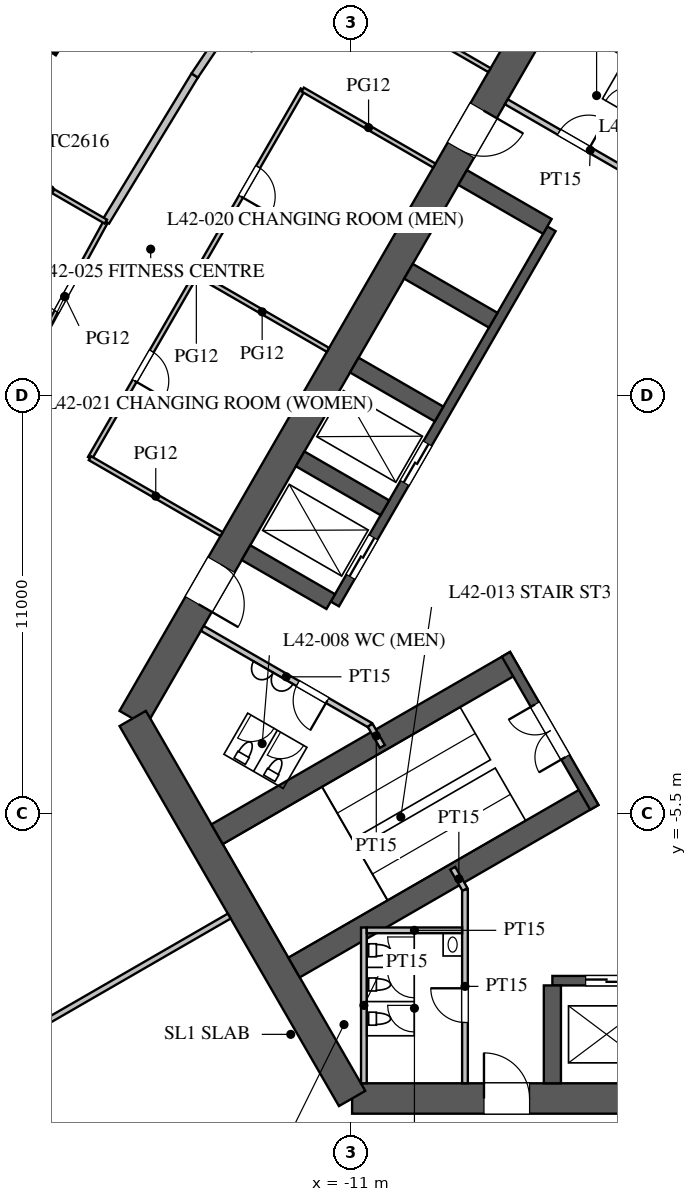
"""IFC4 building model, lengths in metres.
Left out: names, types, materials, properties, quantities, classifications, styles, units other than length and angle.
Written with IfcOpenShell. Run it as: python <this file> out.ifc"""

import sys

from ifc_helpers import new_model, si_unit, direction, frame, frame_2d, origin, origin_2d, place, context, subcontext, project, spatial, rectangle, extrude, element, fill, save


model = new_model("IFC4")
c1 = context("Model", 3, precision=1e-05, world=origin(), true_north=direction((0.0, 1.0)))
c2 = subcontext(c1, "Body", "Model", "MODEL_VIEW")
j1 = project(units=[si_unit("LENGTHUNIT", "METRE"), si_unit("PLANEANGLEUNIT", "RADIAN")], contexts=[c1])
p1 = place(None, origin())
s1 = spatial("IfcSite", under=j1, at=p1, CompositionType="ELEMENT")
p2 = place(p1, origin())
s2 = spatial("IfcBuilding", under=s1, at=p2, CompositionType="ELEMENT")
p3 = place(p2, frame((0.0, 0.0, 184.7)))
s3 = spatial("IfcBuildingStorey", under=s2, at=p3, CompositionType="ELEMENT", Elevation=184.7)
p4 = place(p3, frame((-18.748, 16.02, 0.0), z_axis=(0.0, 0.0, 1.0), x_axis=(-0.539270410114, -0.842132664593, 0.0)))
e1 = element("IfcColumn", 1, at=p4, inside=s3, PredefinedType="COLUMN", context=c2, shape_type="SweptSolid", body=[
    extrude(rectangle(XDim=2.6, YDim=1.6, at=origin_2d()), origin(), (0.0, 0.0, 1.0), 5.0),
])
p5 = place(p3, frame((-10.97, -13.0, 0.0), z_axis=(0.0, 0.0, 1.0), x_axis=(1.0, 0.0, 0.0)))
e2 = element("IfcWall", 2, at=p5, inside=s3, PredefinedType="SHEAR", context=c2, shape_type="SweptSolid", body=[
    extrude(rectangle(XDim=21.939, YDim=0.8, at=frame_2d((10.97, 0.0))), origin(), (0.0, 0.0, 1.0), 5.0),
])
p6 = place(p5, frame((17.27, 0.0, 0.0)))
e3 = element("IfcOpeningElement", 3, at=p6, cuts=e2, PredefinedType="OPENING", context=c2, shape_type="SweptSolid", body=[
    extrude(rectangle(XDim=1.2, YDim=2.1, at=frame_2d((0.6, 1.05))), frame((0.0, 0.41, 0.0), z_axis=(0.0, -1.0, 0.0), x_axis=(1.0, 0.0, 0.0)), (0.0, 0.0, 1.0), 0.82),
])
p7 = place(p5, frame((3.47, 0.0, 0.0)))
e4 = element("IfcOpeningElement", 4, at=p7, cuts=e2, PredefinedType="OPENING", context=c2, shape_type="SweptSolid", body=[
    extrude(rectangle(XDim=1.2, YDim=2.1, at=frame_2d((0.6, 1.05))), frame((0.0, 0.41, 0.0), z_axis=(0.0, -1.0, 0.0), x_axis=(1.0, 0.0, 0.0)), (0.0, 0.0, 1.0), 0.82),
])
p8 = place(p3, frame((-5.773, 16.0, 0.0), z_axis=(0.0, 0.0, 1.0), x_axis=(-0.500002442456, -0.866023993627, 0.0)))
e5 = element("IfcWall", 5, at=p8, inside=s3, PredefinedType="SHEAR", context=c2, shape_type="SweptSolid", body=[
    extrude(rectangle(XDim=21.939, YDim=0.8, at=frame_2d((10.97, 0.0))), origin(), (0.0, 0.0, 1.0), 5.0),
])
p9 = place(p8, frame((17.27, 0.0, 0.0)))
e6 = element("IfcOpeningElement", 6, at=p9, cuts=e5, PredefinedType="OPENING", context=c2, shape_type="SweptSolid", body=[
    extrude(rectangle(XDim=1.2, YDim=2.1, at=frame_2d((0.6, 1.05))), frame((0.0, 0.41, 0.0), z_axis=(0.0, -1.0, 0.0), x_axis=(1.0, 0.0, 0.0)), (0.0, 0.0, 1.0), 0.82),
])
p10 = place(p8, frame((3.47, 0.0, 0.0)))
e7 = element("IfcOpeningElement", 7, at=p10, cuts=e5, PredefinedType="OPENING", context=c2, shape_type="SweptSolid", body=[
    extrude(rectangle(XDim=1.2, YDim=2.1, at=frame_2d((0.6, 1.05))), frame((0.0, 0.41, 0.0), z_axis=(0.0, -1.0, 0.0), x_axis=(1.0, 0.0, 0.0)), (0.0, 0.0, 1.0), 0.82),
])
p11 = place(p3, frame((-16.743, -3.0, 0.0), z_axis=(0.0, 0.0, 1.0), x_axis=(0.499995765644, -0.866027848477, 0.0)))
e8 = element("IfcWall", 8, at=p11, inside=s3, PredefinedType="SHEAR", context=c2, shape_type="SweptSolid", body=[
    extrude(rectangle(XDim=11.547, YDim=0.8, at=frame_2d((5.773, 0.0))), origin(), (0.0, 0.0, 1.0), 5.0),
])
p12 = place(p3, frame((-5.7, -9.9, 0.0), z_axis=(0.0, 0.0, 1.0), x_axis=(1.0, 0.0, 0.0)))
e9 = element("IfcWall", 9, at=p12, inside=s3, PredefinedType="SHEAR", context=c2, shape_type="SweptSolid", body=[
    extrude(rectangle(XDim=11.4, YDim=0.25, at=frame_2d((5.7, 0.0))), origin(), (0.0, 0.0, 1.0), 5.0),
])
p13 = place(p12, frame((0.875, 0.0, 0.0)))
e10 = element("IfcOpeningElement", 10, at=p13, cuts=e9, PredefinedType="OPENING", context=c2, shape_type="SweptSolid", body=[
    extrude(rectangle(XDim=1.1, YDim=2.2, at=frame_2d((0.55, 1.1))), frame((0.0, 0.135, 0.0), z_axis=(0.0, -1.0, 0.0), x_axis=(1.0, 0.0, 0.0)), (0.0, 0.0, 1.0), 0.27),
])
p14 = place(p12, frame((3.725, 0.0, 0.0)))
e11 = element("IfcOpeningElement", 11, at=p14, cuts=e9, PredefinedType="OPENING", context=c2, shape_type="SweptSolid", body=[
    extrude(rectangle(XDim=1.1, YDim=2.2, at=frame_2d((0.55, 1.1))), frame((0.0, 0.135, 0.0), z_axis=(0.0, -1.0, 0.0), x_axis=(1.0, 0.0, 0.0)), (0.0, 0.0, 1.0), 0.27),
])
p15 = place(p12, frame((6.575, 0.0, 0.0)))
e12 = element("IfcOpeningElement", 12, at=p15, cuts=e9, PredefinedType="OPENING", context=c2, shape_type="SweptSolid", body=[
    extrude(rectangle(XDim=1.1, YDim=2.2, at=frame_2d((0.55, 1.1))), frame((0.0, 0.135, 0.0), z_axis=(0.0, -1.0, 0.0), x_axis=(1.0, 0.0, 0.0)), (0.0, 0.0, 1.0), 0.27),
])
p16 = place(p12, frame((9.425, 0.0, 0.0)))
e13 = element("IfcOpeningElement", 13, at=p16, cuts=e9, PredefinedType="OPENING", context=c2, shape_type="SweptSolid", body=[
    extrude(rectangle(XDim=1.1, YDim=2.2, at=frame_2d((0.55, 1.1))), frame((0.0, 0.135, 0.0), z_axis=(0.0, -1.0, 0.0), x_axis=(1.0, 0.0, 0.0)), (0.0, 0.0, 1.0), 0.27),
])
p17 = place(p3, frame((-5.7, -10.025, 0.0), z_axis=(0.0, 0.0, 1.0), x_axis=(0.0, -1.0, 0.0)))
e14 = element("IfcWall", 14, at=p17, inside=s3, PredefinedType="SHEAR", context=c2, shape_type="SweptSolid", body=[
    extrude(rectangle(XDim=2.575, YDim=0.45, at=frame_2d((1.288, 0.0))), origin(), (0.0, 0.0, 1.0), 5.0),
])
p18 = place(p3, frame((-5.724, 9.886, 0.0), z_axis=(0.0, 0.0, 1.0), x_axis=(-0.500001763848, -0.866024385424, 0.0)))
e15 = element("IfcWall", 15, at=p18, inside=s3, PredefinedType="SHEAR", context=c2, shape_type="SweptSolid", body=[
    extrude(rectangle(XDim=11.4, YDim=0.25, at=frame_2d((5.7, 0.0))), origin(), (0.0, 0.0, 1.0), 5.0),
])
p19 = place(p18, frame((6.525, 0.0, 0.0)))
e16 = element("IfcOpeningElement", 16, at=p19, cuts=e15, PredefinedType="OPENING", context=c2, shape_type="SweptSolid", body=[
    extrude(rectangle(XDim=1.2, YDim=2.2, at=frame_2d((0.6, 1.1))), frame((0.0, 0.135, 0.0), z_axis=(0.0, -1.0, 0.0), x_axis=(1.0, 0.0, 0.0)), (0.0, 0.0, 1.0), 0.27),
])
p20 = place(p18, frame((9.375, 0.0, 0.0)))
e17 = element("IfcOpeningElement", 17, at=p20, cuts=e15, PredefinedType="OPENING", context=c2, shape_type="SweptSolid", body=[
    extrude(rectangle(XDim=1.2, YDim=2.2, at=frame_2d((0.6, 1.1))), frame((0.0, 0.135, 0.0), z_axis=(0.0, -1.0, 0.0), x_axis=(1.0, 0.0, 0.0)), (0.0, 0.0, 1.0), 0.27),
])
p21 = place(p3, frame((-5.832, 9.949, 0.0), z_axis=(0.0, 0.0, 1.0), x_axis=(-0.866029291668, 0.499993265928, 0.0)))
e18 = element("IfcWall", 18, at=p21, inside=s3, PredefinedType="SHEAR", context=c2, shape_type="SweptSolid", body=[
    extrude(rectangle(XDim=2.575, YDim=0.45, at=frame_2d((1.288, 0.0))), origin(), (0.0, 0.0, 1.0), 5.0),
])
for number, where, z_axis, x_axis in (
    (19, (-7.257, 7.481, 0.0), (0.0, 0.0, 1.0), (-0.866, 0.5, 0.0)),
    (20, (-8.682, 5.012, 0.0), (0.0, 0.0, 1.0), (-0.866, 0.5, 0.0)),
    (21, (-10.107, 2.544, 0.0), (0.0, 0.0, 1.0), (-0.866, 0.5, 0.0)),
    (22, (-11.532, 0.076, 0.0), (0.0, 0.0, 1.0), (-0.866, 0.5, 0.0)),
):
    element("IfcWall", number, at=place(p3, frame(where, z_axis=z_axis, x_axis=x_axis)), inside=s3, PredefinedType="SHEAR", context=c2, shape_type="SweptSolid", body=[
        extrude(rectangle(XDim=2.575, YDim=0.45, at=frame_2d((1.288, 0.0))), origin(), (0.0, 0.0, 1.0), 5.0),
    ])
for number, where, z_axis, x_axis in (
    (23, (-6.663, -1.509, 0.0), (0.0, 0.0, 1.0), (-0.866, -0.5, 0.0)),
    (24, (-4.638, -5.016, 0.0), (0.0, 0.0, 1.0), (-0.866, -0.5, 0.0)),
):
    element("IfcWall", number, at=place(p3, frame(where, z_axis=z_axis, x_axis=x_axis)), inside=s3, PredefinedType="SHEAR", context=c2, shape_type="SweptSolid", body=[
        extrude(rectangle(XDim=9.075, YDim=0.6, at=frame_2d((4.538, 0.0))), origin(), (0.0, 0.0, 1.0), 5.0),
    ])
p22 = place(p3, frame((-6.922, -1.312, 0.0), z_axis=(0.0, 0.0, 1.0), x_axis=(0.499984536904, -0.866034331223, 0.0)))
e25 = element("IfcWall", 25, at=p22, inside=s3, PredefinedType="SHEAR", context=c2, shape_type="SweptSolid", body=[
    extrude(rectangle(XDim=4.65, YDim=0.25, at=frame_2d((2.325, 0.0))), origin(), (0.0, 0.0, 1.0), 5.0),
])
p23 = place(p22, frame((1.525, 0.0, 0.0)))
e26 = element("IfcOpeningElement", 26, at=p23, cuts=e25, PredefinedType="OPENING", context=c2, shape_type="SweptSolid", body=[
    extrude(rectangle(XDim=1.6, YDim=2.1, at=frame_2d((0.8, 1.05))), frame((0.0, 0.135, 0.0), z_axis=(0.0, -1.0, 0.0), x_axis=(1.0, 0.0, 0.0)), (0.0, 0.0, 1.0), 0.27),
])
p24 = place(p3, frame((-8.0, -7.5, 0.0), z_axis=(0.0, 0.0, 1.0), x_axis=(0.0, -1.0, 0.0)))
e27 = element("IfcWall", 27, at=p24, inside=s3, PredefinedType="PARTITIONING", context=c2, shape_type="SweptSolid", body=[
    extrude(rectangle(XDim=5.1, YDim=0.15, at=frame_2d((2.55, 0.0))), origin(), (0.0, 0.0, 1.0), 4.8),
])
p25 = place(p24, frame((2.6, 0.0, 0.0)))
e28 = element("IfcOpeningElement", 28, at=p25, cuts=e27, PredefinedType="OPENING", context=c2, shape_type="SweptSolid", body=[
    extrude(rectangle(XDim=0.9, YDim=2.1, at=frame_2d((0.45, 1.05))), frame((0.0, 0.085, 0.0), z_axis=(0.0, -1.0, 0.0), x_axis=(1.0, 0.0, 0.0)), (0.0, 0.0, 1.0), 0.17),
])
p26 = place(p3, frame((-10.495, -3.178, 0.0), z_axis=(0.0, 0.0, 1.0), x_axis=(-0.86602216432, 0.500005610874, 0.0)))
e29 = element("IfcWall", 29, at=p26, inside=s3, PredefinedType="PARTITIONING", context=c2, shape_type="SweptSolid", body=[
    extrude(rectangle(XDim=5.1, YDim=0.15, at=frame_2d((2.55, 0.0))), origin(), (0.0, 0.0, 1.0), 4.8),
])
p27 = place(p26, frame((1.3, 0.0, 0.0)))
e30 = element("IfcOpeningElement", 30, at=p27, cuts=e29, PredefinedType="OPENING", context=c2, shape_type="SweptSolid", body=[
    extrude(rectangle(XDim=0.9, YDim=2.1, at=frame_2d((0.45, 1.05))), frame((0.0, 0.085, 0.0), z_axis=(0.0, -1.0, 0.0), x_axis=(1.0, 0.0, 0.0)), (0.0, 0.0, 1.0), 0.17),
])
p28 = place(p3, frame((-2.495, 10.678, 0.0), z_axis=(0.0, 0.0, 1.0), x_axis=(-0.86602216432, 0.500005610874, 0.0)))
e31 = element("IfcWall", 31, at=p28, inside=s3, PredefinedType="PARTITIONING", context=c2, shape_type="SweptSolid", body=[
    extrude(rectangle(XDim=5.1, YDim=0.15, at=frame_2d((2.55, 0.0))), origin(), (0.0, 0.0, 1.0), 4.8),
])
p29 = place(p28, frame((2.6, 0.0, 0.0)))
e32 = element("IfcOpeningElement", 32, at=p29, cuts=e31, PredefinedType="OPENING", context=c2, shape_type="SweptSolid", body=[
    extrude(rectangle(XDim=0.9, YDim=2.1, at=frame_2d((0.45, 1.05))), frame((0.0, 0.085, 0.0), z_axis=(0.0, -1.0, 0.0), x_axis=(1.0, 0.0, 0.0)), (0.0, 0.0, 1.0), 0.17),
])
for number, where, z_axis, x_axis in (
    (33, (-10.495, -3.178, 0.0), (0.0, 0.0, 1.0), (0.5, -0.866, 0.0)),
    (34, (-8.0, -7.5, 0.0), (0.0, 0.0, 1.0), (-0.5, 0.866, 0.0)),
):
    element("IfcWall", number, at=place(p3, frame(where, z_axis=z_axis, x_axis=x_axis)), inside=s3, PredefinedType="PARTITIONING", context=c2, shape_type="SweptSolid", body=[
        extrude(rectangle(XDim=0.645, YDim=0.15, at=frame_2d((0.323, 0.0))), origin(), (0.0, 0.0, 1.0), 4.8),
    ])
p30 = place(p3, frame((-2.031, 13.482, 0.0), z_axis=(0.0, 0.0, 1.0), x_axis=(-0.866050731258, 0.499956128963, 0.0)))
e35 = element("IfcWall", 35, at=p30, inside=s3, PredefinedType="PARTITIONING", context=c2, shape_type="SweptSolid", body=[
    extrude(rectangle(XDim=4.1, YDim=0.15, at=frame_2d((2.05, 0.0))), origin(), (0.0, 0.0, 1.0), 4.8),
])
p31 = place(p3, frame((-10.66, -8.5, 0.0), z_axis=(0.0, 0.0, 1.0), x_axis=(0.0, -1.0, 0.0)))
e36 = element("IfcWall", 36, at=p31, inside=s3, PredefinedType="PARTITIONING", context=c2, shape_type="SweptSolid", body=[
    extrude(rectangle(XDim=4.1, YDim=0.15, at=frame_2d((2.05, 0.0))), origin(), (0.0, 0.0, 1.0), 4.8),
])
p32 = place(p3, frame((-8.075, -8.575, 0.0), z_axis=(0.0, 0.0, 1.0), x_axis=(-1.0, 0.0, 0.0)))
e37 = element("IfcWall", 37, at=p32, inside=s3, PredefinedType="PARTITIONING", context=c2, shape_type="SweptSolid", body=[
    extrude(rectangle(XDim=2.51, YDim=0.15, at=frame_2d((1.255, 0.0))), origin(), (0.0, 0.0, 1.0), 4.8),
])
p33 = place(p3, frame((-14.203, -8.2, 0.0), z_axis=(0.0, 0.0, 1.0), x_axis=(-0.866021600284, -0.500006587798, 0.0)))
e38 = element("IfcWall", 38, at=p33, inside=s3, PredefinedType="PARTITIONING", context=c2, shape_type="SweptSolid", body=[
    extrude(rectangle(XDim=14.95, YDim=0.15, at=frame_2d((7.475, 0.0))), origin(), (0.0, 0.0, 1.0), 3.2),
])
p34 = place(p3, frame((-15.069, 8.7, 0.0), z_axis=(0.0, 0.0, 1.0), x_axis=(-0.500016814911, -0.866015695474, 0.0)))
e39 = element("IfcWall", 39, at=p34, inside=s3, PredefinedType="PARTITIONING", context=c2, shape_type="SweptSolid", body=[
    extrude(rectangle(XDim=5.6, YDim=0.12, at=frame_2d((2.8, 0.0))), origin(), (0.0, 0.0, 1.0), 3.6),
])
p35 = place(p34, frame((2.35, 0.0, 0.0)))
e40 = element("IfcOpeningElement", 40, at=p35, cuts=e39, PredefinedType="OPENING", context=c2, shape_type="SweptSolid", body=[
    extrude(rectangle(XDim=0.9, YDim=2.1, at=frame_2d((0.45, 1.05))), frame((0.0, 0.07, 0.0), z_axis=(0.0, -1.0, 0.0), x_axis=(1.0, 0.0, 0.0)), (0.0, 0.0, 1.0), 0.14),
])
p36 = place(p3, frame((-12.269, 13.55, 0.0), z_axis=(0.0, 0.0, 1.0), x_axis=(-0.49999793692, -0.866026594901, 0.0)))
e41 = element("IfcWall", 41, at=p36, inside=s3, PredefinedType="PARTITIONING", context=c2, shape_type="SweptSolid", body=[
    extrude(rectangle(XDim=5.6, YDim=0.12, at=frame_2d((2.8, 0.0))), origin(), (0.0, 0.0, 1.0), 3.6),
])
p37 = place(p36, frame((2.35, 0.0, 0.0)))
e42 = element("IfcOpeningElement", 42, at=p37, cuts=e41, PredefinedType="OPENING", context=c2, shape_type="SweptSolid", body=[
    extrude(rectangle(XDim=0.9, YDim=2.1, at=frame_2d((0.45, 1.05))), frame((0.0, 0.07, 0.0), z_axis=(0.0, -1.0, 0.0), x_axis=(1.0, 0.0, 0.0)), (0.0, 0.0, 1.0), 0.14),
])
p38 = place(p3, frame((-14.405, 1.85, 0.0), z_axis=(0.0, 0.0, 1.0), x_axis=(-0.866026010844, 0.49999894854, 0.0)))
e43 = element("IfcWall", 43, at=p38, inside=s3, PredefinedType="PARTITIONING", context=c2, shape_type="SweptSolid", body=[
    extrude(rectangle(XDim=4.0, YDim=0.12, at=frame_2d((2.0, 0.0))), origin(), (0.0, 0.0, 1.0), 3.6),
])
p39 = place(p3, frame((-11.605, 6.7, 0.0), z_axis=(0.0, 0.0, 1.0), x_axis=(-0.866026010844, 0.49999894854, 0.0)))
e44 = element("IfcWall", 44, at=p39, inside=s3, PredefinedType="PARTITIONING", context=c2, shape_type="SweptSolid", body=[
    extrude(rectangle(XDim=4.0, YDim=0.12, at=frame_2d((2.0, 0.0))), origin(), (0.0, 0.0, 1.0), 3.4),
])
for number, where, z_axis, x_axis in (
    (45, (-8.805, 11.55, 0.0), (0.0, 0.0, 1.0), (-0.866, 0.5, 0.0)),
    (46, (-7.355, 14.061, 0.0), (0.0, 0.0, 1.0), (-0.866, 0.5, 0.0)),
):
    element("IfcWall", number, at=place(p3, frame(where, z_axis=z_axis, x_axis=x_axis)), inside=s3, PredefinedType="PARTITIONING", context=c2, shape_type="SweptSolid", body=[
        extrude(rectangle(XDim=4.0, YDim=0.12, at=frame_2d((2.0, 0.0))), origin(), (0.0, 0.0, 1.0), 3.6),
    ])
p40 = place(p3, frame((-17.451, 10.075, 0.0), z_axis=(0.0, 0.0, 1.0), x_axis=(-0.479949984371, -0.877295852322, 0.0)))
e47 = element("IfcWall", 47, at=p40, inside=s3, PredefinedType="PARTITIONING", context=c2, shape_type="SweptSolid", body=[
    extrude(rectangle(XDim=4.501, YDim=0.12, at=frame_2d((2.25, 0.0))), origin(), (0.0, 0.0, 1.0), 3.6),
])
p41 = place(p40, frame((1.8, 0.0, 0.0)))
e48 = element("IfcOpeningElement", 48, at=p41, cuts=e47, PredefinedType="OPENING", context=c2, shape_type="SweptSolid", body=[
    extrude(rectangle(XDim=0.9, YDim=2.1, at=frame_2d((0.45, 1.05))), frame((0.0, 0.07, 0.0), z_axis=(0.0, -1.0, 0.0), x_axis=(1.0, 0.0, 0.0)), (0.0, 0.0, 1.0), 0.14),
])
p42 = place(p3, frame((-15.111, 13.921, 0.0), z_axis=(0.0, 0.0, 1.0), x_axis=(-0.519790350351, -0.85429385558, 0.0)))
e49 = element("IfcWall", 49, at=p42, inside=s3, PredefinedType="PARTITIONING", context=c2, shape_type="SweptSolid", body=[
    extrude(rectangle(XDim=4.501, YDim=0.2, at=frame_2d((2.25, 0.0))), origin(), (0.0, 0.0, 1.0), 3.6),
])
p43 = place(p3, frame((-12.592, 17.662, 0.0), z_axis=(0.0, 0.0, 1.0), x_axis=(-0.558466624917, -0.829526991034, 0.0)))
e50 = element("IfcWall", 50, at=p43, inside=s3, PredefinedType="PARTITIONING", context=c2, shape_type="SweptSolid", body=[
    extrude(rectangle(XDim=4.511, YDim=0.2, at=frame_2d((2.255, 0.0))), origin(), (0.0, 0.0, 1.0), 3.6),
])
p44 = place(p43, frame((1.35, 0.0, 0.0)))
e51 = element("IfcOpeningElement", 51, at=p44, cuts=e50, PredefinedType="OPENING", context=c2, shape_type="SweptSolid", body=[
    extrude(rectangle(XDim=1.8, YDim=2.1, at=frame_2d((0.9, 1.05))), frame((0.0, 0.11, 0.0), z_axis=(0.0, -1.0, 0.0), x_axis=(1.0, 0.0, 0.0)), (0.0, 0.0, 1.0), 0.22),
])
p45 = place(p3, frame((-17.451, 10.075, 0.0), z_axis=(0.0, 0.0, 1.0), x_axis=(-0.866045641059, 0.499964946374, 0.0)))
e52 = element("IfcWall", 52, at=p45, inside=s3, PredefinedType="PARTITIONING", context=c2, shape_type="SweptSolid", body=[
    extrude(rectangle(XDim=3.37, YDim=0.12, at=frame_2d((1.685, 0.0))), origin(), (0.0, 0.0, 1.0), 3.4),
])
p46 = place(p25, frame((0.9, 0.0, 0.0), z_axis=(0.0, 0.0, 1.0), x_axis=(-1.0, 0.0, 0.0)))
e53 = element("IfcDoor", 53, at=p46, inside=s3, OperationType="SINGLE_SWING_RIGHT", PredefinedType="DOOR", context=c2, shape_type="SweptSolid", body=[
    extrude(rectangle(XDim=0.9, YDim=2.1, at=frame_2d((0.45, 1.05))), frame((0.0, 0.025, 0.0), z_axis=(0.0, -1.0, 0.0), x_axis=(1.0, 0.0, 0.0)), (0.0, 0.0, 1.0), 0.05),
])
fill(e28, e53)
p47 = place(p27, origin())
e54 = element("IfcDoor", 54, at=p47, inside=s3, OperationType="SINGLE_SWING_LEFT", PredefinedType="DOOR", context=c2, shape_type="SweptSolid", body=[
    extrude(rectangle(XDim=0.9, YDim=2.1, at=frame_2d((0.45, 1.05))), frame((0.0, 0.025, 0.0), z_axis=(0.0, -1.0, 0.0), x_axis=(1.0, 0.0, 0.0)), (0.0, 0.0, 1.0), 0.05),
])
fill(e30, e54)
p48 = place(p29, frame((0.9, 0.0, 0.0), z_axis=(0.0, 0.0, 1.0), x_axis=(-1.0, 0.0, 0.0)))
e55 = element("IfcDoor", 55, at=p48, inside=s3, OperationType="SINGLE_SWING_RIGHT", PredefinedType="DOOR", context=c2, shape_type="SweptSolid", body=[
    extrude(rectangle(XDim=0.9, YDim=2.1, at=frame_2d((0.45, 1.05))), frame((0.0, 0.025, 0.0), z_axis=(0.0, -1.0, 0.0), x_axis=(1.0, 0.0, 0.0)), (0.0, 0.0, 1.0), 0.05),
])
fill(e32, e55)
p49 = place(p23, frame((1.6, 0.0, 0.0), z_axis=(0.0, 0.0, 1.0), x_axis=(-1.0, 0.0, 0.0)))
e56 = element("IfcDoor", 56, at=p49, inside=s3, OperationType="DOUBLE_DOOR_SINGLE_SWING", PredefinedType="DOOR", context=c2, shape_type="SweptSolid", body=[
    extrude(rectangle(XDim=1.6, YDim=2.1, at=frame_2d((0.8, 1.05))), frame((0.0, 0.025, 0.0), z_axis=(0.0, -1.0, 0.0), x_axis=(1.0, 0.0, 0.0)), (0.0, 0.0, 1.0), 0.05),
])
fill(e26, e56)
p50 = place(p7, origin())
e57 = element("IfcDoor", 57, at=p50, inside=s3, OperationType="SINGLE_SWING_LEFT", PredefinedType="DOOR", context=c2, shape_type="SweptSolid", body=[
    extrude(rectangle(XDim=1.2, YDim=2.1, at=frame_2d((0.6, 1.05))), frame((0.0, 0.025, 0.0), z_axis=(0.0, -1.0, 0.0), x_axis=(1.0, 0.0, 0.0)), (0.0, 0.0, 1.0), 0.05),
])
fill(e4, e57)
p51 = place(p9, origin())
e58 = element("IfcDoor", 58, at=p51, inside=s3, OperationType="SINGLE_SWING_RIGHT", PredefinedType="DOOR", context=c2, shape_type="SweptSolid", body=[
    extrude(rectangle(XDim=1.2, YDim=2.1, at=frame_2d((0.6, 1.05))), frame((0.0, 0.025, 0.0), z_axis=(0.0, -1.0, 0.0), x_axis=(1.0, 0.0, 0.0)), (0.0, 0.0, 1.0), 0.05),
])
fill(e6, e58)
p52 = place(p10, origin())
e59 = element("IfcDoor", 59, at=p52, inside=s3, OperationType="SINGLE_SWING_LEFT", PredefinedType="DOOR", context=c2, shape_type="SweptSolid", body=[
    extrude(rectangle(XDim=1.2, YDim=2.1, at=frame_2d((0.6, 1.05))), frame((0.0, 0.025, 0.0), z_axis=(0.0, -1.0, 0.0), x_axis=(1.0, 0.0, 0.0)), (0.0, 0.0, 1.0), 0.05),
])
fill(e7, e59)
p53 = place(p37, origin())
e60 = element("IfcDoor", 60, at=p53, inside=s3, OperationType="SINGLE_SWING_RIGHT", PredefinedType="DOOR", context=c2, shape_type="SweptSolid", body=[
    extrude(rectangle(XDim=0.9, YDim=2.1, at=frame_2d((0.45, 1.05))), frame((0.0, 0.025, 0.0), z_axis=(0.0, -1.0, 0.0), x_axis=(1.0, 0.0, 0.0)), (0.0, 0.0, 1.0), 0.05),
])
fill(e42, e60)
p54 = place(p35, origin())
e61 = element("IfcDoor", 61, at=p54, inside=s3, OperationType="SINGLE_SWING_RIGHT", PredefinedType="DOOR", context=c2, shape_type="SweptSolid", body=[
    extrude(rectangle(XDim=0.9, YDim=2.1, at=frame_2d((0.45, 1.05))), frame((0.0, 0.025, 0.0), z_axis=(0.0, -1.0, 0.0), x_axis=(1.0, 0.0, 0.0)), (0.0, 0.0, 1.0), 0.05),
])
fill(e40, e61)
p55 = place(p41, frame((0.9, 0.0, 0.0), z_axis=(0.0, 0.0, 1.0), x_axis=(-1.0, 0.0, 0.0)))
e62 = element("IfcDoor", 62, at=p55, inside=s3, OperationType="SINGLE_SWING_RIGHT", PredefinedType="DOOR", context=c2, shape_type="SweptSolid", body=[
    extrude(rectangle(XDim=0.9, YDim=2.1, at=frame_2d((0.45, 1.05))), frame((0.0, 0.025, 0.0), z_axis=(0.0, -1.0, 0.0), x_axis=(1.0, 0.0, 0.0)), (0.0, 0.0, 1.0), 0.05),
])
fill(e48, e62)
p56 = place(p13, origin())
e63 = element("IfcDoor", 63, at=p56, inside=s3, OperationType="DOUBLE_DOOR_SLIDING", PredefinedType="DOOR", context=c2, shape_type="SweptSolid", body=[
    extrude(rectangle(XDim=1.1, YDim=2.2, at=frame_2d((0.55, 1.1))), frame((0.0, 0.025, 0.0), z_axis=(0.0, -1.0, 0.0), x_axis=(1.0, 0.0, 0.0)), (0.0, 0.0, 1.0), 0.05),
])
fill(e10, e63)
p57 = place(p19, origin())
e64 = element("IfcDoor", 64, at=p57, inside=s3, OperationType="DOUBLE_DOOR_SLIDING", PredefinedType="DOOR", context=c2, shape_type="SweptSolid", body=[
    extrude(rectangle(XDim=1.2, YDim=2.2, at=frame_2d((0.6, 1.1))), frame((0.0, 0.025, 0.0), z_axis=(0.0, -1.0, 0.0), x_axis=(1.0, 0.0, 0.0)), (0.0, 0.0, 1.0), 0.05),
])
fill(e16, e64)
p58 = place(p20, origin())
e65 = element("IfcDoor", 65, at=p58, inside=s3, OperationType="DOUBLE_DOOR_SLIDING", PredefinedType="DOOR", context=c2, shape_type="SweptSolid", body=[
    extrude(rectangle(XDim=1.2, YDim=2.2, at=frame_2d((0.6, 1.1))), frame((0.0, 0.025, 0.0), z_axis=(0.0, -1.0, 0.0), x_axis=(1.0, 0.0, 0.0)), (0.0, 0.0, 1.0), 0.05),
])
fill(e17, e65)
save(model, sys.argv[1])
